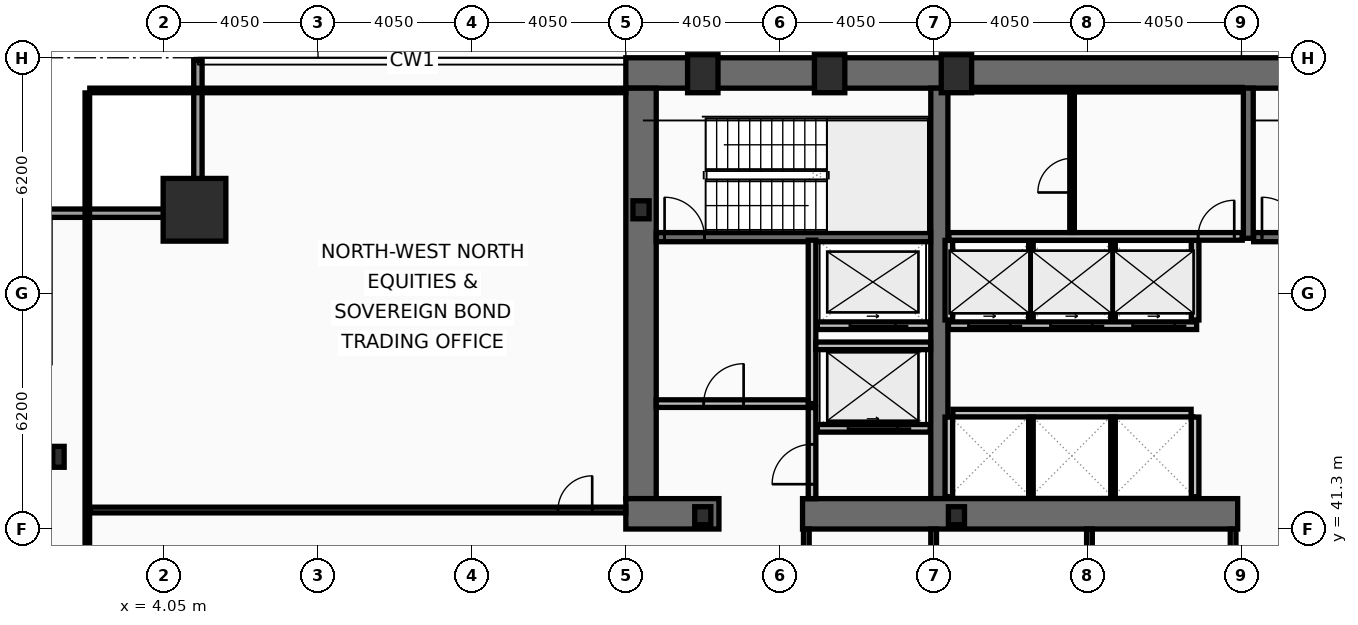
"""IFC4 building model, lengths in metres.
Left out: names, types, materials, properties, quantities, classifications, styles, units other than length and angle.
Written with IfcOpenShell. Run it as: python <this file> out.ifc"""

import sys

from ifc_helpers import new_model, si_unit, direction, frame, frame_2d, origin, origin_2d, place, context, subcontext, project, spatial, rectangle, hollow_rectangle, i_section, extrude, element, fill, save


model = new_model("IFC4")
c1 = context("Model", 3, precision=1e-05, world=origin(), true_north=direction((0.0, 1.0)))
c2 = subcontext(c1, "Body", "Model", "MODEL_VIEW")
j1 = project(units=[si_unit("LENGTHUNIT", "METRE"), si_unit("PLANEANGLEUNIT", "RADIAN")], contexts=[c1])
p1 = place(None, origin())
s1 = spatial("IfcSite", under=j1, at=p1, CompositionType="ELEMENT")
p2 = place(p1, origin())
s2 = spatial("IfcBuilding", under=s1, at=p2, CompositionType="ELEMENT")
p3 = place(p2, frame((0.0, 0.0, 33.8)))
s3 = spatial("IfcBuildingStorey", under=s2, at=p3, CompositionType="ELEMENT", Elevation=33.8)
p4 = place(p3, frame((16.2, 53.3, 0.0), z_axis=(0.0, 0.0, 1.0), x_axis=(1.0, 0.0, 0.0)))
e1 = element("IfcWall", 1, at=p4, inside=s3, PredefinedType="SHEAR", context=c2, shape_type="SweptSolid", body=[
    extrude(rectangle(XDim=40.5, YDim=0.8, at=frame_2d((20.25, 0.0))), origin(), (0.0, 0.0, 1.0), 3.82),
])
p5 = place(p3, frame((16.6, 42.1, 0.0), z_axis=(0.0, 0.0, 1.0), x_axis=(0.0, 1.0, 0.0)))
e2 = element("IfcWall", 2, at=p5, inside=s3, PredefinedType="SHEAR", context=c2, shape_type="SweptSolid", body=[
    extrude(rectangle(XDim=10.8, YDim=0.8, at=frame_2d((5.4, 0.0))), origin(), (0.0, 0.0, 1.0), 3.82),
])
p6 = place(p3, frame((24.45, 42.1, 0.0), z_axis=(0.0, 0.0, 1.0), x_axis=(0.0, 1.0, 0.0)))
e3 = element("IfcWall", 3, at=p6, inside=s3, PredefinedType="SHEAR", context=c2, shape_type="SweptSolid", body=[
    extrude(rectangle(XDim=10.8, YDim=0.45, at=frame_2d((5.4, 0.0))), origin(), (0.0, 0.0, 1.0), 3.82),
])
p7 = place(p3, frame((18.65, 41.7, 0.0), z_axis=(0.0, 0.0, 1.0), x_axis=(-1.0, 0.0, 0.0)))
e4 = element("IfcWall", 4, at=p7, inside=s3, PredefinedType="SHEAR", context=c2, shape_type="SweptSolid", body=[
    extrude(rectangle(XDim=2.45, YDim=0.8, at=frame_2d((1.225, 0.0))), origin(), (0.0, 0.0, 1.0), 3.82),
])
p8 = place(p3, frame((32.3, 41.7, 0.0), z_axis=(0.0, 0.0, 1.0), x_axis=(-1.0, 0.0, 0.0)))
e5 = element("IfcWall", 5, at=p8, inside=s3, PredefinedType="SHEAR", context=c2, shape_type="SweptSolid", body=[
    extrude(rectangle(XDim=11.45, YDim=0.8, at=frame_2d((5.725, 0.0))), origin(), (0.0, 0.0, 1.0), 3.82),
])
p9 = place(p3, frame((32.58, 48.95, 0.0), z_axis=(0.0, 0.0, 1.0), x_axis=(0.0, 1.0, 0.0)))
e6 = element("IfcWall", 6, at=p9, inside=s3, PredefinedType="SHEAR", context=c2, shape_type="SweptSolid", body=[
    extrude(rectangle(XDim=3.95, YDim=0.26, at=frame_2d((1.975, 0.0))), origin(), (0.0, 0.0, 1.0), 3.82),
])
p10 = place(p3, frame((17.0, 48.98, 0.0), z_axis=(0.0, 0.0, 1.0), x_axis=(1.0, 0.0, 0.0)))
e7 = element("IfcWall", 7, at=p10, inside=s3, PredefinedType="SHEAR", context=c2, shape_type="SweptSolid", body=[
    extrude(rectangle(XDim=7.22, YDim=0.24, at=frame_2d((3.61, 0.0))), origin(), (0.0, 0.0, 1.0), 3.82),
])
p11 = place(p10, frame((0.22, 0.0, 0.0)))
e8 = element("IfcOpeningElement", 8, at=p11, cuts=e7, PredefinedType="OPENING", context=c2, shape_type="SweptSolid", body=[
    extrude(rectangle(XDim=1.05, YDim=2.15, at=frame_2d((0.525, 1.075))), frame((0.0, 0.13, 0.0), z_axis=(0.0, -1.0, 0.0), x_axis=(1.0, 0.0, 0.0)), (0.0, 0.0, 1.0), 0.26),
])
p12 = place(p3, frame((32.72, 48.98, 0.0), z_axis=(0.0, 0.0, 1.0), x_axis=(1.0, 0.0, 0.0)))
e9 = element("IfcWall", 9, at=p12, inside=s3, PredefinedType="SHEAR", context=c2, shape_type="SweptSolid", body=[
    extrude(rectangle(XDim=7.56, YDim=0.24, at=frame_2d((3.78, 0.0))), origin(), (0.0, 0.0, 1.0), 3.82),
])
p13 = place(p12, frame((0.22, 0.0, 0.0)))
e10 = element("IfcOpeningElement", 10, at=p13, cuts=e9, PredefinedType="OPENING", context=c2, shape_type="SweptSolid", body=[
    extrude(rectangle(XDim=1.05, YDim=2.15, at=frame_2d((0.525, 1.075))), frame((0.0, 0.13, 0.0), z_axis=(0.0, -1.0, 0.0), x_axis=(1.0, 0.0, 0.0)), (0.0, 0.0, 1.0), 0.26),
])
p14 = place(p3, frame((4.85, 49.7, 0.0), z_axis=(0.0, 0.0, 1.0), x_axis=(1.0, 0.0, 0.0)))
e11 = element("IfcColumn", 11, at=p14, inside=s3, PredefinedType="COLUMN", context=c2, shape_type="SweptSolid", body=[
    extrude(hollow_rectangle(XDim=1.65, YDim=1.65, WallThickness=0.075, at=origin_2d()), origin(), (0.0, 0.0, 1.0), 4.0),
])
for number, where, z_axis, x_axis in (
    (12, (18.225, 53.28, 0.0), (0.0, 0.0, 1.0), (1.0, 0.0, 0.0)),
    (13, (21.562, 53.28, 0.0), (0.0, 0.0, 1.0), (1.0, 0.0, 0.0)),
    (14, (24.9, 53.28, 0.0), (0.0, 0.0, 1.0), (1.0, 0.0, 0.0)),
):
    element("IfcColumn", number, at=place(p3, frame(where, z_axis=z_axis, x_axis=x_axis)), inside=s3, PredefinedType="COLUMN", context=c2, shape_type="SweptSolid", body=[
        extrude(hollow_rectangle(XDim=0.8, YDim=1.0, WallThickness=0.055, at=origin_2d()), origin(), (0.0, 0.0, 1.0), 4.0),
    ])
p15 = place(p3, frame((1.27, 43.2, 0.0), z_axis=(0.0, 0.0, 1.0), x_axis=(1.0, 0.0, 0.0)))
e15 = element("IfcColumn", 15, at=p15, inside=s3, PredefinedType="COLUMN", context=c2, shape_type="SweptSolid", body=[
    extrude(i_section(OverallWidth=0.3, OverallDepth=0.55, WebThickness=0.015, FlangeThickness=0.029, at=origin_2d()), origin(), (0.0, 0.0, 1.0), 4.0),
])
for number, where, z_axis, x_axis in (
    (16, (16.6, 49.7, 0.0), (0.0, 0.0, 1.0), (1.0, 0.0, 0.0)),
    (17, (18.225, 41.65, 0.0), (0.0, 0.0, 1.0), (1.0, 0.0, 0.0)),
    (18, (24.9, 41.65, 0.0), (0.0, 0.0, 1.0), (1.0, 0.0, 0.0)),
):
    element("IfcColumn", number, at=place(p3, frame(where, z_axis=z_axis, x_axis=x_axis)), inside=s3, PredefinedType="COLUMN", context=c2, shape_type="SweptSolid", body=[
        extrude(i_section(OverallWidth=0.424, OverallDepth=0.474, WebThickness=0.048, FlangeThickness=0.077, at=origin_2d()), origin(), (0.0, 0.0, 1.0), 4.0),
    ])
p16 = place(p3, frame((0.83, 49.61, 0.0), z_axis=(0.0, 0.0, 1.0), x_axis=(1.0, 0.0, 0.0)))
e19 = element("IfcWall", 19, at=p16, inside=s3, PredefinedType="SOLIDWALL", context=c2, shape_type="SweptSolid", body=[
    extrude(rectangle(XDim=4.22, YDim=0.22, at=frame_2d((2.11, 0.0))), origin(), (0.0, 0.0, 1.0), 3.16),
])
p17 = place(p3, frame((4.94, 49.72, 0.0), z_axis=(0.0, 0.0, 1.0), x_axis=(0.0, 1.0, 0.0)))
e20 = element("IfcWall", 20, at=p17, inside=s3, PredefinedType="SOLIDWALL", context=c2, shape_type="SweptSolid", body=[
    extrude(rectangle(XDim=3.91, YDim=0.22, at=frame_2d((1.955, 0.0))), origin(), (0.0, 0.0, 1.0), 3.16),
])
p18 = place(p3, frame((24.21, 43.95, 0.0), z_axis=(0.0, 0.0, 1.0), x_axis=(-1.0, 0.0, 0.0)))
e21 = element("IfcWall", 21, at=p18, inside=s3, PredefinedType="PARTITIONING", context=c2, shape_type="SweptSolid", body=[
    extrude(rectangle(XDim=2.97, YDim=0.2, at=frame_2d((1.485, 0.0))), origin(), (0.0, 0.0, 1.0), 3.82),
])
p19 = place(p18, frame((0.86, 0.0, 0.0)))
e22 = element("IfcOpeningElement", 22, at=p19, cuts=e21, PredefinedType="OPENING", context=c2, shape_type="SweptSolid", body=[
    extrude(rectangle(XDim=1.3, YDim=2.18, at=frame_2d((0.65, 1.09))), frame((0.0, 0.11, 0.0), z_axis=(0.0, -1.0, 0.0), x_axis=(1.0, 0.0, 0.0)), (0.0, 0.0, 1.0), 0.22),
])
p20 = place(p3, frame((24.21, 46.65, 0.0), z_axis=(0.0, 0.0, 1.0), x_axis=(-1.0, 0.0, 0.0)))
e23 = element("IfcWall", 23, at=p20, inside=s3, PredefinedType="PARTITIONING", context=c2, shape_type="SweptSolid", body=[
    extrude(rectangle(XDim=2.97, YDim=0.2, at=frame_2d((1.485, 0.0))), origin(), (0.0, 0.0, 1.0), 3.82),
])
p21 = place(p20, frame((0.91, 0.0, 0.0)))
e24 = element("IfcOpeningElement", 24, at=p21, cuts=e23, PredefinedType="OPENING", context=c2, shape_type="SweptSolid", body=[
    extrude(rectangle(XDim=1.2, YDim=2.18, at=frame_2d((0.6, 1.09))), frame((0.0, 0.11, 0.0), z_axis=(0.0, -1.0, 0.0), x_axis=(1.0, 0.0, 0.0)), (0.0, 0.0, 1.0), 0.22),
])
p22 = place(p3, frame((31.22, 46.65, 0.0), z_axis=(0.0, 0.0, 1.0), x_axis=(-1.0, 0.0, 0.0)))
e25 = element("IfcWall", 25, at=p22, inside=s3, PredefinedType="PARTITIONING", context=c2, shape_type="SweptSolid", body=[
    extrude(rectangle(XDim=6.53, YDim=0.2, at=frame_2d((3.265, 0.0))), origin(), (0.0, 0.0, 1.0), 3.82),
])
p23 = place(p22, frame((4.9, 0.0, 0.0)))
e26 = element("IfcOpeningElement", 26, at=p23, cuts=e25, PredefinedType="OPENING", context=c2, shape_type="SweptSolid", body=[
    extrude(rectangle(XDim=1.1, YDim=2.18, at=frame_2d((0.55, 1.09))), frame((0.0, 0.11, 0.0), z_axis=(0.0, -1.0, 0.0), x_axis=(1.0, 0.0, 0.0)), (0.0, 0.0, 1.0), 0.22),
])
p24 = place(p22, frame((2.74, 0.0, 0.0)))
e27 = element("IfcOpeningElement", 27, at=p24, cuts=e25, PredefinedType="OPENING", context=c2, shape_type="SweptSolid", body=[
    extrude(rectangle(XDim=1.1, YDim=2.18, at=frame_2d((0.55, 1.09))), frame((0.0, 0.11, 0.0), z_axis=(0.0, -1.0, 0.0), x_axis=(1.0, 0.0, 0.0)), (0.0, 0.0, 1.0), 0.22),
])
p25 = place(p22, frame((0.58, 0.0, 0.0)))
e28 = element("IfcOpeningElement", 28, at=p25, cuts=e25, PredefinedType="OPENING", context=c2, shape_type="SweptSolid", body=[
    extrude(rectangle(XDim=1.1, YDim=2.18, at=frame_2d((0.55, 1.09))), frame((0.0, 0.11, 0.0), z_axis=(0.0, -1.0, 0.0), x_axis=(1.0, 0.0, 0.0)), (0.0, 0.0, 1.0), 0.22),
])
p26 = place(p3, frame((21.1, 44.6, 0.0), z_axis=(0.0, 0.0, 1.0), x_axis=(0.0, 1.0, 0.0)))
e29 = element("IfcWall", 29, at=p26, inside=s3, PredefinedType="PARTITIONING", context=c2, shape_type="SweptSolid", body=[
    extrude(rectangle(XDim=4.3, YDim=0.2, at=frame_2d((2.15, 0.0))), origin(), (0.0, 0.0, 1.0), 3.82),
])
p27 = place(p3, frame((17.0, 44.6, 0.0), z_axis=(0.0, 0.0, 1.0), x_axis=(1.0, 0.0, 0.0)))
e30 = element("IfcWall", 30, at=p27, inside=s3, PredefinedType="PARTITIONING", context=c2, shape_type="SweptSolid", body=[
    extrude(rectangle(XDim=4.0, YDim=0.2, at=frame_2d((2.0, 0.0))), origin(), (0.0, 0.0, 1.0), 3.82),
])
p28 = place(p27, frame((1.25, 0.0, 0.0)))
e31 = element("IfcOpeningElement", 31, at=p28, cuts=e30, PredefinedType="OPENING", context=c2, shape_type="SweptSolid", body=[
    extrude(rectangle(XDim=1.05, YDim=2.15, at=frame_2d((0.525, 1.075))), frame((0.0, 0.11, 0.0), z_axis=(0.0, -1.0, 0.0), x_axis=(1.0, 0.0, 0.0)), (0.0, 0.0, 1.0), 0.22),
])
p29 = place(p3, frame((21.2, 46.12, 0.0), z_axis=(0.0, 0.0, 1.0), x_axis=(1.0, 0.0, 0.0)))
e32 = element("IfcWall", 32, at=p29, inside=s3, PredefinedType="PARTITIONING", context=c2, shape_type="SweptSolid", body=[
    extrude(rectangle(XDim=3.02, YDim=0.2, at=frame_2d((1.51, 0.0))), origin(), (0.0, 0.0, 1.0), 3.82),
])
p30 = place(p3, frame((21.1, 42.1, 0.0), z_axis=(0.0, 0.0, 1.0), x_axis=(0.0, 1.0, 0.0)))
e33 = element("IfcWall", 33, at=p30, inside=s3, PredefinedType="PARTITIONING", context=c2, shape_type="SweptSolid", body=[
    extrude(rectangle(XDim=2.395, YDim=0.2, at=frame_2d((1.198, 0.0))), origin(), (0.0, 0.0, 1.0), 3.82),
])
p31 = place(p30, frame((0.38, 0.0, 0.0)))
e34 = element("IfcOpeningElement", 34, at=p31, cuts=e33, PredefinedType="OPENING", context=c2, shape_type="SweptSolid", body=[
    extrude(rectangle(XDim=1.05, YDim=2.15, at=frame_2d((0.525, 1.075))), frame((0.0, 0.11, 0.0), z_axis=(0.0, -1.0, 0.0), x_axis=(1.0, 0.0, 0.0)), (0.0, 0.0, 1.0), 0.22),
])
for number, where, z_axis, x_axis in (
    (35, (24.7, 46.8, 0.0), (0.0, 0.0, 1.0), (0.0, 1.0, 0.0)),
    (36, (31.18, 46.8, 0.0), (0.0, 0.0, 1.0), (0.0, 1.0, 0.0)),
):
    element("IfcWall", number, at=place(p3, frame(where, z_axis=z_axis, x_axis=x_axis)), inside=s3, PredefinedType="PARTITIONING", context=c2, shape_type="SweptSolid", body=[
        extrude(rectangle(XDim=2.095, YDim=0.2, at=frame_2d((1.047, 0.0))), origin(), (0.0, 0.0, 1.0), 3.82),
    ])
for number, where, z_axis, x_axis in (
    (37, (26.86, 46.8, 0.0), (0.0, 0.0, 1.0), (0.0, 1.0, 0.0)),
    (38, (29.02, 46.8, 0.0), (0.0, 0.0, 1.0), (0.0, 1.0, 0.0)),
):
    element("IfcWall", number, at=place(p3, frame(where, z_axis=z_axis, x_axis=x_axis)), inside=s3, PredefinedType="PARTITIONING", context=c2, shape_type="SweptSolid", body=[
        extrude(rectangle(XDim=2.095, YDim=0.12, at=frame_2d((1.047, 0.0))), origin(), (0.0, 0.0, 1.0), 3.82),
    ])
p32 = place(p3, frame((24.805, 44.35, 0.0), z_axis=(0.0, 0.0, 1.0), x_axis=(1.0, 0.0, 0.0)))
e39 = element("IfcWall", 39, at=p32, inside=s3, PredefinedType="PARTITIONING", context=c2, shape_type="SweptSolid", body=[
    extrude(rectangle(XDim=6.27, YDim=0.2, at=frame_2d((3.135, 0.0))), origin(), (0.0, 0.0, 1.0), 3.82),
])
for number, where, z_axis, x_axis in (
    (40, (24.7, 42.15, 0.0), (0.0, 0.0, 1.0), (0.0, 1.0, 0.0)),
    (41, (31.18, 42.15, 0.0), (0.0, 0.0, 1.0), (0.0, 1.0, 0.0)),
):
    element("IfcWall", number, at=place(p3, frame(where, z_axis=z_axis, x_axis=x_axis)), inside=s3, PredefinedType="PARTITIONING", context=c2, shape_type="SweptSolid", body=[
        extrude(rectangle(XDim=2.095, YDim=0.2, at=frame_2d((1.048, 0.0))), origin(), (0.0, 0.0, 1.0), 3.82),
    ])
for number, where, z_axis, x_axis in (
    (42, (26.86, 42.15, 0.0), (0.0, 0.0, 1.0), (0.0, 1.0, 0.0)),
    (43, (29.02, 42.15, 0.0), (0.0, 0.0, 1.0), (0.0, 1.0, 0.0)),
):
    element("IfcWall", number, at=place(p3, frame(where, z_axis=z_axis, x_axis=x_axis)), inside=s3, PredefinedType="PARTITIONING", context=c2, shape_type="SweptSolid", body=[
        extrude(rectangle(XDim=2.095, YDim=0.12, at=frame_2d((1.048, 0.0))), origin(), (0.0, 0.0, 1.0), 3.82),
    ])
p33 = place(p3, frame((24.7, 52.86, 0.0), z_axis=(0.0, 0.0, 1.0), x_axis=(1.0, 0.0, 0.0)))
e44 = element("IfcWall", 44, at=p33, inside=s3, PredefinedType="PARTITIONING", context=c2, shape_type="SweptSolid", body=[
    extrude(rectangle(XDim=7.72, YDim=0.12, at=frame_2d((3.86, 0.0))), origin(), (0.0, 0.0, 1.0), 3.82),
])
p34 = place(p3, frame((24.7, 49.0, 0.0), z_axis=(0.0, 0.0, 1.0), x_axis=(1.0, 0.0, 0.0)))
e45 = element("IfcWall", 45, at=p34, inside=s3, PredefinedType="PARTITIONING", context=c2, shape_type="SweptSolid", body=[
    extrude(rectangle(XDim=7.72, YDim=0.2, at=frame_2d((3.86, 0.0))), origin(), (0.0, 0.0, 1.0), 3.82),
])
p35 = place(p34, frame((6.56, 0.0, 0.0)))
e46 = element("IfcOpeningElement", 46, at=p35, cuts=e45, PredefinedType="OPENING", context=c2, shape_type="SweptSolid", body=[
    extrude(rectangle(XDim=0.95, YDim=2.1, at=frame_2d((0.475, 1.05))), frame((0.0, 0.11, 0.0), z_axis=(0.0, -1.0, 0.0), x_axis=(1.0, 0.0, 0.0)), (0.0, 0.0, 1.0), 0.22),
])
p36 = place(p3, frame((27.942, 49.105, 0.0), z_axis=(0.0, 0.0, 1.0), x_axis=(0.0, 1.0, 0.0)))
e47 = element("IfcWall", 47, at=p36, inside=s3, PredefinedType="PARTITIONING", context=c2, shape_type="SweptSolid", body=[
    extrude(rectangle(XDim=3.69, YDim=0.12, at=frame_2d((1.845, 0.0))), origin(), (0.0, 0.0, 1.0), 3.82),
])
p37 = place(p36, frame((1.05, 0.0, 0.0)))
e48 = element("IfcOpeningElement", 48, at=p37, cuts=e47, PredefinedType="OPENING", context=c2, shape_type="SweptSolid", body=[
    extrude(rectangle(XDim=0.9, YDim=2.05, at=frame_2d((0.45, 1.025))), frame((0.0, 0.07, 0.0), z_axis=(0.0, -1.0, 0.0), x_axis=(1.0, 0.0, 0.0)), (0.0, 0.0, 1.0), 0.14),
])
for number, where, z_axis, x_axis in (
    (49, (20.95, 38.28, 0.0), (0.0, 0.0, 1.0), (0.0, 1.0, 0.0)),
    (50, (24.3, 38.28, 0.0), (0.0, 0.0, 1.0), (0.0, 1.0, 0.0)),
    (51, (28.4, 38.28, 0.0), (0.0, 0.0, 1.0), (0.0, 1.0, 0.0)),
    (52, (32.18, 38.28, 0.0), (0.0, 0.0, 1.0), (0.0, 1.0, 0.0)),
):
    element("IfcWall", number, at=place(p3, frame(where, z_axis=z_axis, x_axis=x_axis)), inside=s3, PredefinedType="PARTITIONING", context=c2, shape_type="SweptSolid", body=[
        extrude(rectangle(XDim=3.02, YDim=0.15, at=frame_2d((1.51, 0.0))), origin(), (0.0, 0.0, 1.0), 3.82),
    ])
p38 = place(p3, frame((2.095, 41.8, 0.0), z_axis=(0.0, 0.0, 1.0), x_axis=(1.0, 0.0, 0.0)))
e53 = element("IfcWall", 53, at=p38, inside=s3, PredefinedType="PARTITIONING", context=c2, shape_type="SweptSolid", body=[
    extrude(rectangle(XDim=14.105, YDim=0.15, at=frame_2d((7.052, 0.0))), origin(), (0.0, 0.0, 1.0), 3.82),
])
p39 = place(p38, frame((12.32, 0.0, 0.0)))
e54 = element("IfcOpeningElement", 54, at=p39, cuts=e53, PredefinedType="OPENING", context=c2, shape_type="SweptSolid", body=[
    extrude(rectangle(XDim=0.9, YDim=2.05, at=frame_2d((0.45, 1.025))), frame((0.0, 0.085, 0.0), z_axis=(0.0, -1.0, 0.0), x_axis=(1.0, 0.0, 0.0)), (0.0, 0.0, 1.0), 0.17),
])
p40 = place(p3, frame((2.03, 10.665, 0.0), z_axis=(0.0, 0.0, 1.0), x_axis=(0.0, 1.0, 0.0)))
e55 = element("IfcWall", 55, at=p40, inside=s3, PredefinedType="PARTITIONING", context=c2, shape_type="SweptSolid", body=[
    extrude(rectangle(XDim=42.11, YDim=0.12, at=frame_2d((21.055, 0.0))), origin(), (0.0, 0.0, 1.0), 3.01),
])
p41 = place(p3, frame((2.095, 52.84, 0.0), z_axis=(0.0, 0.0, 1.0), x_axis=(1.0, 0.0, 0.0)))
e56 = element("IfcWall", 56, at=p41, inside=s3, PredefinedType="PARTITIONING", context=c2, shape_type="SweptSolid", body=[
    extrude(rectangle(XDim=14.105, YDim=0.12, at=frame_2d((7.052, 0.0))), origin(), (0.0, 0.0, 1.0), 3.82),
])
p42 = place(p11, origin())
e57 = element("IfcDoor", 57, at=p42, inside=s3, OperationType="SINGLE_SWING_LEFT", PredefinedType="DOOR", context=c2, shape_type="SweptSolid", body=[
    extrude(rectangle(XDim=1.05, YDim=2.15, at=frame_2d((0.525, 1.075))), frame((0.0, 0.025, 0.0), z_axis=(0.0, -1.0, 0.0), x_axis=(1.0, 0.0, 0.0)), (0.0, 0.0, 1.0), 0.05),
])
fill(e8, e57)
p43 = place(p13, origin())
e58 = element("IfcDoor", 58, at=p43, inside=s3, OperationType="SINGLE_SWING_LEFT", PredefinedType="DOOR", context=c2, shape_type="SweptSolid", body=[
    extrude(rectangle(XDim=1.05, YDim=2.15, at=frame_2d((0.525, 1.075))), frame((0.0, 0.025, 0.0), z_axis=(0.0, -1.0, 0.0), x_axis=(1.0, 0.0, 0.0)), (0.0, 0.0, 1.0), 0.05),
])
fill(e10, e58)
p44 = place(p19, origin())
e59 = element("IfcDoor", 59, at=p44, inside=s3, OperationType="SLIDING_TO_LEFT", PredefinedType="DOOR", context=c2, shape_type="SweptSolid", body=[
    extrude(rectangle(XDim=1.3, YDim=2.18, at=frame_2d((0.65, 1.09))), frame((0.0, 0.025, 0.0), z_axis=(0.0, -1.0, 0.0), x_axis=(1.0, 0.0, 0.0)), (0.0, 0.0, 1.0), 0.05),
])
fill(e22, e59)
p45 = place(p21, origin())
e60 = element("IfcDoor", 60, at=p45, inside=s3, OperationType="SLIDING_TO_LEFT", PredefinedType="DOOR", context=c2, shape_type="SweptSolid", body=[
    extrude(rectangle(XDim=1.2, YDim=2.18, at=frame_2d((0.6, 1.09))), frame((0.0, 0.025, 0.0), z_axis=(0.0, -1.0, 0.0), x_axis=(1.0, 0.0, 0.0)), (0.0, 0.0, 1.0), 0.05),
])
fill(e24, e60)
p46 = place(p23, origin())
e61 = element("IfcDoor", 61, at=p46, inside=s3, OperationType="SLIDING_TO_LEFT", PredefinedType="DOOR", context=c2, shape_type="SweptSolid", body=[
    extrude(rectangle(XDim=1.1, YDim=2.18, at=frame_2d((0.55, 1.09))), frame((0.0, 0.025, 0.0), z_axis=(0.0, -1.0, 0.0), x_axis=(1.0, 0.0, 0.0)), (0.0, 0.0, 1.0), 0.05),
])
fill(e26, e61)
p47 = place(p24, origin())
e62 = element("IfcDoor", 62, at=p47, inside=s3, OperationType="SLIDING_TO_LEFT", PredefinedType="DOOR", context=c2, shape_type="SweptSolid", body=[
    extrude(rectangle(XDim=1.1, YDim=2.18, at=frame_2d((0.55, 1.09))), frame((0.0, 0.025, 0.0), z_axis=(0.0, -1.0, 0.0), x_axis=(1.0, 0.0, 0.0)), (0.0, 0.0, 1.0), 0.05),
])
fill(e27, e62)
p48 = place(p25, origin())
e63 = element("IfcDoor", 63, at=p48, inside=s3, OperationType="SLIDING_TO_LEFT", PredefinedType="DOOR", context=c2, shape_type="SweptSolid", body=[
    extrude(rectangle(XDim=1.1, YDim=2.18, at=frame_2d((0.55, 1.09))), frame((0.0, 0.025, 0.0), z_axis=(0.0, -1.0, 0.0), x_axis=(1.0, 0.0, 0.0)), (0.0, 0.0, 1.0), 0.05),
])
fill(e28, e63)
p49 = place(p28, origin())
e64 = element("IfcDoor", 64, at=p49, inside=s3, OperationType="SINGLE_SWING_RIGHT", PredefinedType="DOOR", context=c2, shape_type="SweptSolid", body=[
    extrude(rectangle(XDim=1.05, YDim=2.15, at=frame_2d((0.525, 1.075))), frame((0.0, 0.025, 0.0), z_axis=(0.0, -1.0, 0.0), x_axis=(1.0, 0.0, 0.0)), (0.0, 0.0, 1.0), 0.05),
])
fill(e31, e64)
p50 = place(p31, origin())
e65 = element("IfcDoor", 65, at=p50, inside=s3, OperationType="SINGLE_SWING_LEFT", PredefinedType="DOOR", context=c2, shape_type="SweptSolid", body=[
    extrude(rectangle(XDim=1.05, YDim=2.15, at=frame_2d((0.525, 1.075))), frame((0.0, 0.025, 0.0), z_axis=(0.0, -1.0, 0.0), x_axis=(1.0, 0.0, 0.0)), (0.0, 0.0, 1.0), 0.05),
])
fill(e34, e65)
p51 = place(p35, origin())
e66 = element("IfcDoor", 66, at=p51, inside=s3, OperationType="SINGLE_SWING_RIGHT", PredefinedType="DOOR", context=c2, shape_type="SweptSolid", body=[
    extrude(rectangle(XDim=0.95, YDim=2.1, at=frame_2d((0.475, 1.05))), frame((0.0, 0.025, 0.0), z_axis=(0.0, -1.0, 0.0), x_axis=(1.0, 0.0, 0.0)), (0.0, 0.0, 1.0), 0.05),
])
fill(e46, e66)
p52 = place(p37, origin())
e67 = element("IfcDoor", 67, at=p52, inside=s3, OperationType="SINGLE_SWING_LEFT", PredefinedType="DOOR", context=c2, shape_type="SweptSolid", body=[
    extrude(rectangle(XDim=0.9, YDim=2.05, at=frame_2d((0.45, 1.025))), frame((0.0, 0.025, 0.0), z_axis=(0.0, -1.0, 0.0), x_axis=(1.0, 0.0, 0.0)), (0.0, 0.0, 1.0), 0.05),
])
fill(e48, e67)
p53 = place(p39, origin())
e68 = element("IfcDoor", 68, at=p53, inside=s3, OperationType="SINGLE_SWING_RIGHT", PredefinedType="DOOR", context=c2, shape_type="SweptSolid", body=[
    extrude(rectangle(XDim=0.9, YDim=2.05, at=frame_2d((0.45, 1.025))), frame((0.0, 0.025, 0.0), z_axis=(0.0, -1.0, 0.0), x_axis=(1.0, 0.0, 0.0)), (0.0, 0.0, 1.0), 0.05),
])
fill(e54, e68)
save(model, sys.argv[1])
